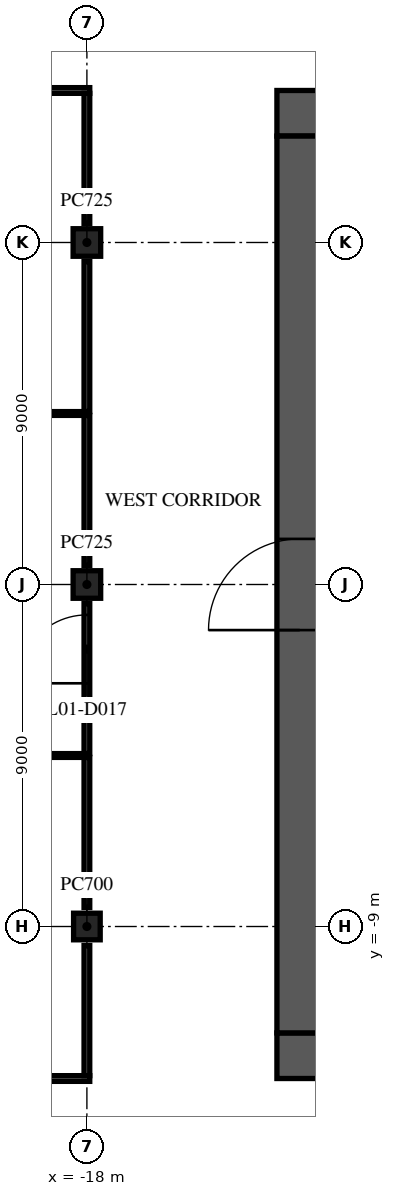
"""IFC4 building model, lengths in metres.
Left out: names, types, materials, properties, quantities, classifications, styles, units other than length and angle.
Written with IfcOpenShell. Run it as: python <this file> out.ifc"""

import sys

from ifc_helpers import new_model, si_unit, direction, frame, frame_2d, origin, origin_2d, place, context, subcontext, project, spatial, rectangle, extrude, element, fill, save


model = new_model("IFC4")
c1 = context("Model", 3, precision=1e-05, world=origin(), true_north=direction((0.0, 1.0)))
c2 = subcontext(c1, "Body", "Model", "MODEL_VIEW")
j1 = project(units=[si_unit("LENGTHUNIT", "METRE"), si_unit("PLANEANGLEUNIT", "RADIAN")], contexts=[c1])
p1 = place(None, origin())
s1 = spatial("IfcSite", under=j1, at=p1, CompositionType="ELEMENT")
p2 = place(p1, origin())
s2 = spatial("IfcBuilding", under=s1, at=p2, CompositionType="ELEMENT")
p3 = place(p2, frame((0.0, 0.0, 4.5)))
s3 = spatial("IfcBuildingStorey", under=s2, at=p3, CompositionType="ELEMENT", Elevation=4.5)
p4 = place(p3, frame((-18.0, -9.0, 0.0), z_axis=(0.0, 0.0, 1.0), x_axis=(1.0, 0.0, 0.0)))
e1 = element("IfcColumn", 1, at=p4, inside=s3, PredefinedType="COLUMN", context=c2, shape_type="SweptSolid", body=[
    extrude(rectangle(XDim=0.7, YDim=0.7, at=origin_2d()), origin(), (0.0, 0.0, 1.0), 4.5),
])
for number, where, z_axis, x_axis in (
    (2, (-18.0, 0.0, 0.0), (0.0, 0.0, 1.0), (1.0, 0.0, 0.0)),
    (3, (-18.0, 9.0, 0.0), (0.0, 0.0, 1.0), (1.0, 0.0, 0.0)),
):
    element("IfcColumn", number, at=place(p3, frame(where, z_axis=z_axis, x_axis=x_axis)), inside=s3, PredefinedType="COLUMN", context=c2, shape_type="SweptSolid", body=[
        extrude(rectangle(XDim=0.725, YDim=0.725, at=origin_2d()), origin(), (0.0, 0.0, 1.0), 4.5),
    ])
p5 = place(p3, frame((-13.0, 12.4, 0.0), z_axis=(0.0, 0.0, 1.0), x_axis=(1.0, 0.0, 0.0)))
e4 = element("IfcWall", 4, at=p5, inside=s3, PredefinedType="SHEAR", context=c2, shape_type="SweptSolid", body=[
    extrude(rectangle(XDim=26.0, YDim=1.2, at=frame_2d((13.0, 0.0))), origin(), (0.0, 0.0, 1.0), 4.1),
])
p6 = place(p5, frame((11.8, 0.0, 0.0)))
e5 = element("IfcOpeningElement", 5, at=p6, cuts=e4, PredefinedType="OPENING", context=c2, shape_type="SweptSolid", body=[
    extrude(rectangle(XDim=2.4, YDim=2.4, at=frame_2d((1.2, 1.2))), frame((0.0, 0.61, 0.0), z_axis=(0.0, -1.0, 0.0), x_axis=(1.0, 0.0, 0.0)), (0.0, 0.0, 1.0), 1.22),
])
p7 = place(p5, frame((22.625, 0.0, 0.0)))
e6 = element("IfcOpeningElement", 6, at=p7, cuts=e4, PredefinedType="OPENING", context=c2, shape_type="SweptSolid", body=[
    extrude(rectangle(XDim=1.2, YDim=2.1, at=frame_2d((0.6, 1.05))), frame((0.0, 0.61, 0.0), z_axis=(0.0, -1.0, 0.0), x_axis=(1.0, 0.0, 0.0)), (0.0, 0.0, 1.0), 1.22),
])
p8 = place(p5, frame((1.6, 0.0, 0.0)))
e7 = element("IfcOpeningElement", 7, at=p8, cuts=e4, PredefinedType="OPENING", context=c2, shape_type="SweptSolid", body=[
    extrude(rectangle(XDim=1.0, YDim=2.1, at=frame_2d((0.5, 1.05))), frame((0.0, 0.61, 0.0), z_axis=(0.0, -1.0, 0.0), x_axis=(1.0, 0.0, 0.0)), (0.0, 0.0, 1.0), 1.22),
])
p9 = place(p3, frame((-13.0, -12.4, 0.0), z_axis=(0.0, 0.0, 1.0), x_axis=(1.0, 0.0, 0.0)))
e8 = element("IfcWall", 8, at=p9, inside=s3, PredefinedType="SHEAR", context=c2, shape_type="SweptSolid", body=[
    extrude(rectangle(XDim=26.0, YDim=1.2, at=frame_2d((13.0, 0.0))), origin(), (0.0, 0.0, 1.0), 4.1),
])
p10 = place(p9, frame((7.9, 0.0, 0.0)))
e9 = element("IfcOpeningElement", 9, at=p10, cuts=e8, PredefinedType="OPENING", context=c2, shape_type="SweptSolid", body=[
    extrude(rectangle(XDim=2.0, YDim=2.1, at=frame_2d((1.0, 1.05))), frame((0.0, 0.61, 0.0), z_axis=(0.0, -1.0, 0.0), x_axis=(1.0, 0.0, 0.0)), (0.0, 0.0, 1.0), 1.22),
])
p11 = place(p9, frame((18.025, 0.0, 0.0)))
e10 = element("IfcOpeningElement", 10, at=p11, cuts=e8, PredefinedType="OPENING", context=c2, shape_type="SweptSolid", body=[
    extrude(rectangle(XDim=1.2, YDim=2.1, at=frame_2d((0.6, 1.05))), frame((0.0, 0.61, 0.0), z_axis=(0.0, -1.0, 0.0), x_axis=(1.0, 0.0, 0.0)), (0.0, 0.0, 1.0), 1.22),
])
p12 = place(p9, frame((2.175, 0.0, 0.0)))
e11 = element("IfcOpeningElement", 11, at=p12, cuts=e8, PredefinedType="OPENING", context=c2, shape_type="SweptSolid", body=[
    extrude(rectangle(XDim=1.2, YDim=2.1, at=frame_2d((0.6, 1.05))), frame((0.0, 0.61, 0.0), z_axis=(0.0, -1.0, 0.0), x_axis=(1.0, 0.0, 0.0)), (0.0, 0.0, 1.0), 1.22),
])
p13 = place(p9, frame((22.625, 0.0, 0.0)))
e12 = element("IfcOpeningElement", 12, at=p13, cuts=e8, PredefinedType="OPENING", context=c2, shape_type="SweptSolid", body=[
    extrude(rectangle(XDim=1.2, YDim=2.1, at=frame_2d((0.6, 1.05))), frame((0.0, 0.61, 0.0), z_axis=(0.0, -1.0, 0.0), x_axis=(1.0, 0.0, 0.0)), (0.0, 0.0, 1.0), 1.22),
])
p14 = place(p3, frame((-12.4, -11.8, 0.0), z_axis=(0.0, 0.0, 1.0), x_axis=(0.0, 1.0, 0.0)))
e13 = element("IfcWall", 13, at=p14, inside=s3, PredefinedType="SHEAR", context=c2, shape_type="SweptSolid", body=[
    extrude(rectangle(XDim=23.6, YDim=1.2, at=frame_2d((11.8, 0.0))), origin(), (0.0, 0.0, 1.0), 4.1),
])
p15 = place(p14, frame((10.6, 0.0, 0.0)))
e14 = element("IfcOpeningElement", 14, at=p15, cuts=e13, PredefinedType="OPENING", context=c2, shape_type="SweptSolid", body=[
    extrude(rectangle(XDim=2.4, YDim=2.4, at=frame_2d((1.2, 1.2))), frame((0.0, 0.61, 0.0), z_axis=(0.0, -1.0, 0.0), x_axis=(1.0, 0.0, 0.0)), (0.0, 0.0, 1.0), 1.22),
])
p16 = place(p3, frame((-36.0, -13.0, 0.0), z_axis=(0.0, 0.0, 1.0), x_axis=(1.0, 0.0, 0.0)))
e15 = element("IfcWall", 15, at=p16, inside=s3, PredefinedType="PARTITIONING", context=c2, shape_type="SweptSolid", body=[
    extrude(rectangle(XDim=18.075, YDim=0.15, at=frame_2d((9.038, 0.0))), origin(), (0.0, 0.0, 1.0), 4.1),
])
p17 = place(p16, frame((8.5, 0.0, 0.0)))
e16 = element("IfcOpeningElement", 16, at=p17, cuts=e15, PredefinedType="OPENING", context=c2, shape_type="SweptSolid", body=[
    extrude(rectangle(XDim=1.0, YDim=2.1, at=frame_2d((0.5, 1.05))), frame((0.0, 0.085, 0.0), z_axis=(0.0, -1.0, 0.0), x_axis=(1.0, 0.0, 0.0)), (0.0, 0.0, 1.0), 0.17),
])
for number, where, z_axis, x_axis in (
    (17, (-36.0, -4.5, 0.0), (0.0, 0.0, 1.0), (1.0, 0.0, 0.0)),
    (18, (-36.0, 4.5, 0.0), (0.0, 0.0, 1.0), (1.0, 0.0, 0.0)),
):
    element("IfcWall", number, at=place(p3, frame(where, z_axis=z_axis, x_axis=x_axis)), inside=s3, PredefinedType="PARTITIONING", context=c2, shape_type="SweptSolid", body=[
        extrude(rectangle(XDim=17.925, YDim=0.1, at=frame_2d((8.962, 0.0))), origin(), (0.0, 0.0, 1.0), 4.1),
    ])
p18 = place(p3, frame((-36.0, 13.0, 0.0), z_axis=(0.0, 0.0, 1.0), x_axis=(1.0, 0.0, 0.0)))
e19 = element("IfcWall", 19, at=p18, inside=s3, PredefinedType="PARTITIONING", context=c2, shape_type="SweptSolid", body=[
    extrude(rectangle(XDim=18.075, YDim=0.15, at=frame_2d((9.038, 0.0))), origin(), (0.0, 0.0, 1.0), 4.1),
])
p19 = place(p18, frame((8.5, 0.0, 0.0)))
e20 = element("IfcOpeningElement", 20, at=p19, cuts=e19, PredefinedType="OPENING", context=c2, shape_type="SweptSolid", body=[
    extrude(rectangle(XDim=1.0, YDim=2.1, at=frame_2d((0.5, 1.05))), frame((0.0, 0.085, 0.0), z_axis=(0.0, -1.0, 0.0), x_axis=(1.0, 0.0, 0.0)), (0.0, 0.0, 1.0), 0.17),
])
p20 = place(p3, frame((-18.0, -12.925, 0.0), z_axis=(0.0, 0.0, 1.0), x_axis=(0.0, 1.0, 0.0)))
e21 = element("IfcWall", 21, at=p20, inside=s3, PredefinedType="PARTITIONING", context=c2, shape_type="SweptSolid", body=[
    extrude(rectangle(XDim=3.425, YDim=0.15, at=frame_2d((1.712, 0.0))), origin(), (0.0, 0.0, 1.0), 4.1),
])
p21 = place(p3, frame((-18.0, -8.5, 0.0), z_axis=(0.0, 0.0, 1.0), x_axis=(0.0, 1.0, 0.0)))
e22 = element("IfcWall", 22, at=p21, inside=s3, PredefinedType="PARTITIONING", context=c2, shape_type="SweptSolid", body=[
    extrude(rectangle(XDim=3.95, YDim=0.15, at=frame_2d((1.975, 0.0))), origin(), (0.0, 0.0, 1.0), 4.1),
])
p22 = place(p3, frame((-18.0, -4.45, 0.0), z_axis=(0.0, 0.0, 1.0), x_axis=(0.0, 1.0, 0.0)))
e23 = element("IfcWall", 23, at=p22, inside=s3, PredefinedType="PARTITIONING", context=c2, shape_type="SweptSolid", body=[
    extrude(rectangle(XDim=3.95, YDim=0.15, at=frame_2d((1.975, 0.0))), origin(), (0.0, 0.0, 1.0), 4.1),
])
p23 = place(p22, frame((1.85, 0.0, 0.0)))
e24 = element("IfcOpeningElement", 24, at=p23, cuts=e23, PredefinedType="OPENING", context=c2, shape_type="SweptSolid", body=[
    extrude(rectangle(XDim=1.8, YDim=2.1, at=frame_2d((0.9, 1.05))), frame((0.0, 0.085, 0.0), z_axis=(0.0, -1.0, 0.0), x_axis=(1.0, 0.0, 0.0)), (0.0, 0.0, 1.0), 0.17),
])
for number, where, z_axis, x_axis in (
    (25, (-18.0, 0.5, 0.0), (0.0, 0.0, 1.0), (0.0, 1.0, 0.0)),
    (26, (-18.0, 4.55, 0.0), (0.0, 0.0, 1.0), (0.0, 1.0, 0.0)),
):
    element("IfcWall", number, at=place(p3, frame(where, z_axis=z_axis, x_axis=x_axis)), inside=s3, PredefinedType="PARTITIONING", context=c2, shape_type="SweptSolid", body=[
        extrude(rectangle(XDim=3.95, YDim=0.15, at=frame_2d((1.975, 0.0))), origin(), (0.0, 0.0, 1.0), 4.1),
    ])
p24 = place(p3, frame((-18.0, 9.5, 0.0), z_axis=(0.0, 0.0, 1.0), x_axis=(0.0, 1.0, 0.0)))
e27 = element("IfcWall", 27, at=p24, inside=s3, PredefinedType="PARTITIONING", context=c2, shape_type="SweptSolid", body=[
    extrude(rectangle(XDim=3.425, YDim=0.15, at=frame_2d((1.712, 0.0))), origin(), (0.0, 0.0, 1.0), 4.1),
])
p25 = place(p15, origin())
e28 = element("IfcDoor", 28, at=p25, inside=s3, OperationType="SINGLE_SWING_LEFT", PredefinedType="DOOR", context=c2, shape_type="SweptSolid", body=[
    extrude(rectangle(XDim=2.4, YDim=2.4, at=frame_2d((1.2, 1.2))), frame((0.0, 0.025, 0.0), z_axis=(0.0, -1.0, 0.0), x_axis=(1.0, 0.0, 0.0)), (0.0, 0.0, 1.0), 0.05),
])
fill(e14, e28)
p26 = place(p23, origin())
e29 = element("IfcDoor", 29, at=p26, inside=s3, OperationType="DOUBLE_DOOR_SINGLE_SWING", PredefinedType="DOOR", context=c2, shape_type="SweptSolid", body=[
    extrude(rectangle(XDim=1.8, YDim=2.1, at=frame_2d((0.9, 1.05))), frame((0.0, 0.025, 0.0), z_axis=(0.0, -1.0, 0.0), x_axis=(1.0, 0.0, 0.0)), (0.0, 0.0, 1.0), 0.05),
])
fill(e24, e29)
save(model, sys.argv[1])
